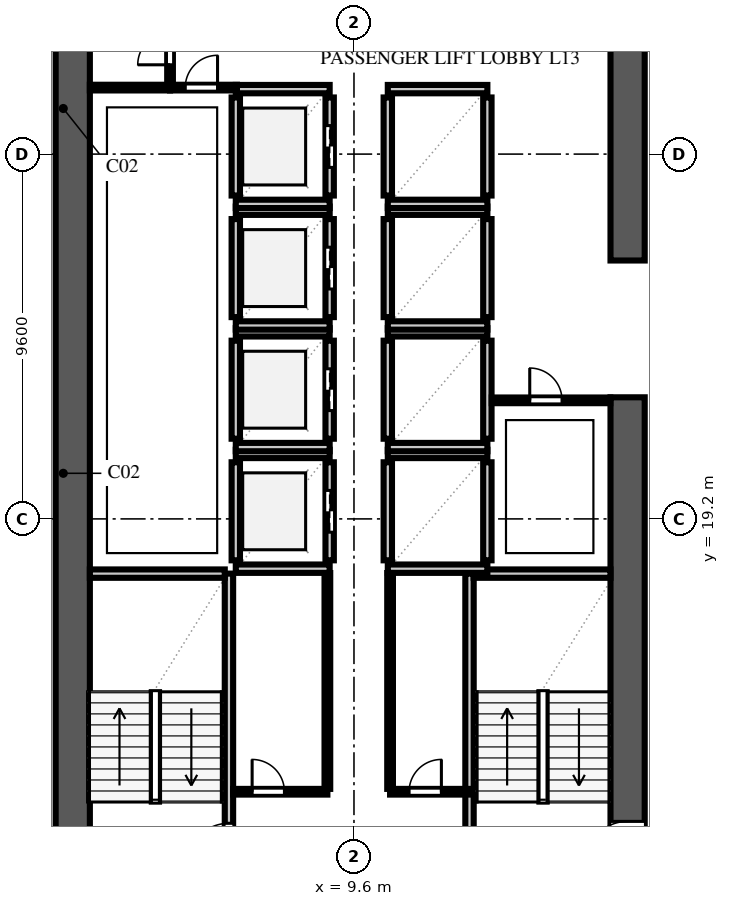
"""IFC4 building model, lengths in metres.
Left out: names, types, materials, properties, quantities, classifications, styles, units other than length and angle.
Written with IfcOpenShell. Run it as: python <this file> out.ifc"""

import sys

from ifc_helpers import new_model, si_unit, direction, frame, frame_2d, origin, place, context, subcontext, project, spatial, rectangle, extrude, element, fill, save


model = new_model("IFC4")
c1 = context("Model", 3, precision=1e-05, world=origin(), true_north=direction((0.0, 1.0)))
c2 = subcontext(c1, "Body", "Model", "MODEL_VIEW")
j1 = project(units=[si_unit("LENGTHUNIT", "METRE"), si_unit("PLANEANGLEUNIT", "RADIAN")], contexts=[c1])
p1 = place(None, origin())
s1 = spatial("IfcSite", under=j1, at=p1, CompositionType="ELEMENT")
p2 = place(p1, origin())
s2 = spatial("IfcBuilding", under=s1, at=p2, CompositionType="ELEMENT")
p3 = place(p2, frame((0.0, 0.0, 54.6)))
s3 = spatial("IfcBuildingStorey", under=s2, at=p3, CompositionType="ELEMENT", Elevation=54.6)
p4 = place(p3, frame((2.2, 9.15, 0.0), z_axis=(0.0, 0.0, 1.0), x_axis=(0.0, 1.0, 0.0)))
e1 = element("IfcWall", 1, at=p4, inside=s3, PredefinedType="SHEAR", context=c2, shape_type="SweptSolid", body=[
    extrude(rectangle(XDim=39.3, YDim=0.9, at=frame_2d((19.65, 0.0))), origin(), (0.0, 0.0, 1.0), 3.54),
])
p5 = place(p3, frame((16.8, 10.05, 0.0), z_axis=(0.0, 0.0, 1.0), x_axis=(0.0, 1.0, 0.0)))
e2 = element("IfcWall", 2, at=p5, inside=s3, PredefinedType="SHEAR", context=c2, shape_type="SweptSolid", body=[
    extrude(rectangle(XDim=12.35, YDim=0.9, at=frame_2d((6.175, 0.0))), origin(), (0.0, 0.0, 1.0), 3.54),
])
p6 = place(p5, frame((0.09, 0.0, 0.0)))
e3 = element("IfcOpeningElement", 3, at=p6, cuts=e2, PredefinedType="OPENING", context=c2, shape_type="SweptSolid", body=[
    extrude(rectangle(XDim=1.1, YDim=2.2, at=frame_2d((0.55, 1.1))), frame((0.0, 0.462, 0.0), z_axis=(0.0, -1.0, 0.0), x_axis=(1.0, 0.0, 0.0)), (0.0, 0.0, 1.0), 0.924),
])
p7 = place(p3, frame((16.8, 26.0, 0.0), z_axis=(0.0, 0.0, 1.0), x_axis=(0.0, 1.0, 0.0)))
e4 = element("IfcWall", 4, at=p7, inside=s3, PredefinedType="SHEAR", context=c2, shape_type="SweptSolid", body=[
    extrude(rectangle(XDim=7.8, YDim=0.9, at=frame_2d((3.9, 0.0))), origin(), (0.0, 0.0, 1.0), 3.54),
])
p8 = place(p3, frame((6.31, 9.95, 0.0), z_axis=(0.0, 0.0, 1.0), x_axis=(0.0, 1.0, 0.0)))
e5 = element("IfcWall", 5, at=p8, inside=s3, PredefinedType="SOLIDWALL", context=c2, shape_type="SweptSolid", body=[
    extrude(rectangle(XDim=7.81, YDim=0.22, at=frame_2d((3.905, 0.0))), origin(), (0.0, 0.0, 1.0), 3.54),
])
p9 = place(p8, frame((0.14, 0.0, 0.0)))
e6 = element("IfcOpeningElement", 6, at=p9, cuts=e5, PredefinedType="OPENING", context=c2, shape_type="SweptSolid", body=[
    extrude(rectangle(XDim=1.1, YDim=2.2, at=frame_2d((0.55, 1.1))), frame((0.0, 0.122, 0.0), z_axis=(0.0, -1.0, 0.0), x_axis=(1.0, 0.0, 0.0)), (0.0, 0.0, 1.0), 0.244),
])
p10 = place(p3, frame((2.65, 17.76, 0.0), z_axis=(0.0, 0.0, 1.0), x_axis=(1.0, 0.0, 0.0)))
e7 = element("IfcWall", 7, at=p10, inside=s3, PredefinedType="SOLIDWALL", context=c2, shape_type="SweptSolid", body=[
    extrude(rectangle(XDim=3.55, YDim=0.22, at=frame_2d((1.775, 0.0))), origin(), (0.0, 0.0, 1.0), 3.54),
])
p11 = place(p3, frame((12.64, 10.05, 0.0), z_axis=(0.0, 0.0, 1.0), x_axis=(0.0, 1.0, 0.0)))
e8 = element("IfcWall", 8, at=p11, inside=s3, PredefinedType="SOLIDWALL", context=c2, shape_type="SweptSolid", body=[
    extrude(rectangle(XDim=7.71, YDim=0.22, at=frame_2d((3.855, 0.0))), origin(), (0.0, 0.0, 1.0), 3.54),
])
p12 = place(p3, frame((12.75, 17.76, 0.0), z_axis=(0.0, 0.0, 1.0), x_axis=(1.0, 0.0, 0.0)))
e9 = element("IfcWall", 9, at=p12, inside=s3, PredefinedType="SOLIDWALL", context=c2, shape_type="SweptSolid", body=[
    extrude(rectangle(XDim=3.6, YDim=0.22, at=frame_2d((1.8, 0.0))), origin(), (0.0, 0.0, 1.0), 3.54),
])
p13 = place(p3, frame((6.49, 18.11, 0.0), z_axis=(0.0, 0.0, 1.0), x_axis=(0.0, 1.0, 0.0)))
e10 = element("IfcWall", 10, at=p13, inside=s3, PredefinedType="SOLIDWALL", context=c2, shape_type="SweptSolid", body=[
    extrude(rectangle(XDim=2.58, YDim=0.22, at=frame_2d((1.29, 0.0))), origin(), (0.0, 0.0, 1.0), 3.54),
])
p14 = place(p3, frame((8.96, 18.11, 0.0), z_axis=(0.0, 0.0, 1.0), x_axis=(0.0, 1.0, 0.0)))
e11 = element("IfcWall", 11, at=p14, inside=s3, PredefinedType="SOLIDWALL", context=c2, shape_type="SweptSolid", body=[
    extrude(rectangle(XDim=2.58, YDim=0.22, at=frame_2d((1.29, 0.0))), origin(), (0.0, 0.0, 1.0), 3.54),
])
p15 = place(p14, frame((0.74, 0.0, 0.0)))
e12 = element("IfcOpeningElement", 12, at=p15, cuts=e11, PredefinedType="OPENING", context=c2, shape_type="SweptSolid", body=[
    extrude(rectangle(XDim=1.1, YDim=2.2, at=frame_2d((0.55, 1.1))), frame((0.0, 0.122, 0.0), z_axis=(0.0, -1.0, 0.0), x_axis=(1.0, 0.0, 0.0)), (0.0, 0.0, 1.0), 0.244),
])
for number, where, z_axis, x_axis in (
    (13, (6.49, 17.89, 0.0), (0.0, 0.0, 1.0), (1.0, 0.0, 0.0)),
    (14, (6.49, 20.91, 0.0), (0.0, 0.0, 1.0), (1.0, 0.0, 0.0)),
):
    element("IfcWall", number, at=place(p3, frame(where, z_axis=z_axis, x_axis=x_axis)), inside=s3, PredefinedType="SOLIDWALL", context=c2, shape_type="SweptSolid", body=[
        extrude(rectangle(XDim=2.47, YDim=0.22, at=frame_2d((1.235, 0.0))), origin(), (0.0, 0.0, 1.0), 3.54),
    ])
p16 = place(p3, frame((6.49, 21.31, 0.0), z_axis=(0.0, 0.0, 1.0), x_axis=(0.0, 1.0, 0.0)))
e15 = element("IfcWall", 15, at=p16, inside=s3, PredefinedType="SOLIDWALL", context=c2, shape_type="SweptSolid", body=[
    extrude(rectangle(XDim=2.58, YDim=0.22, at=frame_2d((1.29, 0.0))), origin(), (0.0, 0.0, 1.0), 3.54),
])
p17 = place(p3, frame((8.96, 21.31, 0.0), z_axis=(0.0, 0.0, 1.0), x_axis=(0.0, 1.0, 0.0)))
e16 = element("IfcWall", 16, at=p17, inside=s3, PredefinedType="SOLIDWALL", context=c2, shape_type="SweptSolid", body=[
    extrude(rectangle(XDim=2.58, YDim=0.22, at=frame_2d((1.29, 0.0))), origin(), (0.0, 0.0, 1.0), 3.54),
])
p18 = place(p17, frame((0.74, 0.0, 0.0)))
e17 = element("IfcOpeningElement", 17, at=p18, cuts=e16, PredefinedType="OPENING", context=c2, shape_type="SweptSolid", body=[
    extrude(rectangle(XDim=1.1, YDim=2.2, at=frame_2d((0.55, 1.1))), frame((0.0, 0.122, 0.0), z_axis=(0.0, -1.0, 0.0), x_axis=(1.0, 0.0, 0.0)), (0.0, 0.0, 1.0), 0.244),
])
for number, where, z_axis, x_axis in (
    (18, (6.49, 21.09, 0.0), (0.0, 0.0, 1.0), (1.0, 0.0, 0.0)),
    (19, (6.49, 24.11, 0.0), (0.0, 0.0, 1.0), (1.0, 0.0, 0.0)),
):
    element("IfcWall", number, at=place(p3, frame(where, z_axis=z_axis, x_axis=x_axis)), inside=s3, PredefinedType="SOLIDWALL", context=c2, shape_type="SweptSolid", body=[
        extrude(rectangle(XDim=2.47, YDim=0.22, at=frame_2d((1.235, 0.0))), origin(), (0.0, 0.0, 1.0), 3.54),
    ])
p19 = place(p3, frame((6.49, 24.51, 0.0), z_axis=(0.0, 0.0, 1.0), x_axis=(0.0, 1.0, 0.0)))
e20 = element("IfcWall", 20, at=p19, inside=s3, PredefinedType="SOLIDWALL", context=c2, shape_type="SweptSolid", body=[
    extrude(rectangle(XDim=2.58, YDim=0.22, at=frame_2d((1.29, 0.0))), origin(), (0.0, 0.0, 1.0), 3.54),
])
p20 = place(p3, frame((8.96, 24.51, 0.0), z_axis=(0.0, 0.0, 1.0), x_axis=(0.0, 1.0, 0.0)))
e21 = element("IfcWall", 21, at=p20, inside=s3, PredefinedType="SOLIDWALL", context=c2, shape_type="SweptSolid", body=[
    extrude(rectangle(XDim=2.58, YDim=0.22, at=frame_2d((1.29, 0.0))), origin(), (0.0, 0.0, 1.0), 3.54),
])
p21 = place(p20, frame((0.74, 0.0, 0.0)))
e22 = element("IfcOpeningElement", 22, at=p21, cuts=e21, PredefinedType="OPENING", context=c2, shape_type="SweptSolid", body=[
    extrude(rectangle(XDim=1.1, YDim=2.2, at=frame_2d((0.55, 1.1))), frame((0.0, 0.122, 0.0), z_axis=(0.0, -1.0, 0.0), x_axis=(1.0, 0.0, 0.0)), (0.0, 0.0, 1.0), 0.244),
])
for number, where, z_axis, x_axis in (
    (23, (6.49, 24.29, 0.0), (0.0, 0.0, 1.0), (1.0, 0.0, 0.0)),
    (24, (6.49, 27.31, 0.0), (0.0, 0.0, 1.0), (1.0, 0.0, 0.0)),
):
    element("IfcWall", number, at=place(p3, frame(where, z_axis=z_axis, x_axis=x_axis)), inside=s3, PredefinedType="SOLIDWALL", context=c2, shape_type="SweptSolid", body=[
        extrude(rectangle(XDim=2.47, YDim=0.22, at=frame_2d((1.235, 0.0))), origin(), (0.0, 0.0, 1.0), 3.54),
    ])
p22 = place(p3, frame((6.49, 27.71, 0.0), z_axis=(0.0, 0.0, 1.0), x_axis=(0.0, 1.0, 0.0)))
e25 = element("IfcWall", 25, at=p22, inside=s3, PredefinedType="SOLIDWALL", context=c2, shape_type="SweptSolid", body=[
    extrude(rectangle(XDim=2.58, YDim=0.22, at=frame_2d((1.29, 0.0))), origin(), (0.0, 0.0, 1.0), 3.54),
])
p23 = place(p3, frame((8.96, 27.71, 0.0), z_axis=(0.0, 0.0, 1.0), x_axis=(0.0, 1.0, 0.0)))
e26 = element("IfcWall", 26, at=p23, inside=s3, PredefinedType="SOLIDWALL", context=c2, shape_type="SweptSolid", body=[
    extrude(rectangle(XDim=2.58, YDim=0.22, at=frame_2d((1.29, 0.0))), origin(), (0.0, 0.0, 1.0), 3.54),
])
p24 = place(p23, frame((0.74, 0.0, 0.0)))
e27 = element("IfcOpeningElement", 27, at=p24, cuts=e26, PredefinedType="OPENING", context=c2, shape_type="SweptSolid", body=[
    extrude(rectangle(XDim=1.1, YDim=2.2, at=frame_2d((0.55, 1.1))), frame((0.0, 0.122, 0.0), z_axis=(0.0, -1.0, 0.0), x_axis=(1.0, 0.0, 0.0)), (0.0, 0.0, 1.0), 0.244),
])
for number, where, z_axis, x_axis in (
    (28, (6.49, 27.49, 0.0), (0.0, 0.0, 1.0), (1.0, 0.0, 0.0)),
    (29, (6.49, 30.51, 0.0), (0.0, 0.0, 1.0), (1.0, 0.0, 0.0)),
):
    element("IfcWall", number, at=place(p3, frame(where, z_axis=z_axis, x_axis=x_axis)), inside=s3, PredefinedType="SOLIDWALL", context=c2, shape_type="SweptSolid", body=[
        extrude(rectangle(XDim=2.47, YDim=0.22, at=frame_2d((1.235, 0.0))), origin(), (0.0, 0.0, 1.0), 3.54),
    ])
for number, where, z_axis, x_axis in (
    (30, (10.49, 18.11, 0.0), (0.0, 0.0, 1.0), (0.0, 1.0, 0.0)),
    (31, (13.11, 18.11, 0.0), (0.0, 0.0, 1.0), (0.0, 1.0, 0.0)),
):
    element("IfcWall", number, at=place(p3, frame(where, z_axis=z_axis, x_axis=x_axis)), inside=s3, PredefinedType="SOLIDWALL", context=c2, shape_type="SweptSolid", body=[
        extrude(rectangle(XDim=2.58, YDim=0.22, at=frame_2d((1.29, 0.0))), origin(), (0.0, 0.0, 1.0), 3.54),
    ])
for number, where, z_axis, x_axis in (
    (32, (10.49, 17.89, 0.0), (0.0, 0.0, 1.0), (1.0, 0.0, 0.0)),
    (33, (10.49, 20.91, 0.0), (0.0, 0.0, 1.0), (1.0, 0.0, 0.0)),
):
    element("IfcWall", number, at=place(p3, frame(where, z_axis=z_axis, x_axis=x_axis)), inside=s3, PredefinedType="SOLIDWALL", context=c2, shape_type="SweptSolid", body=[
        extrude(rectangle(XDim=2.62, YDim=0.22, at=frame_2d((1.31, 0.0))), origin(), (0.0, 0.0, 1.0), 3.54),
    ])
for number, where, z_axis, x_axis in (
    (34, (10.49, 21.31, 0.0), (0.0, 0.0, 1.0), (0.0, 1.0, 0.0)),
    (35, (13.11, 21.31, 0.0), (0.0, 0.0, 1.0), (0.0, 1.0, 0.0)),
):
    element("IfcWall", number, at=place(p3, frame(where, z_axis=z_axis, x_axis=x_axis)), inside=s3, PredefinedType="SOLIDWALL", context=c2, shape_type="SweptSolid", body=[
        extrude(rectangle(XDim=2.58, YDim=0.22, at=frame_2d((1.29, 0.0))), origin(), (0.0, 0.0, 1.0), 3.54),
    ])
for number, where, z_axis, x_axis in (
    (36, (10.49, 21.09, 0.0), (0.0, 0.0, 1.0), (1.0, 0.0, 0.0)),
    (37, (10.49, 24.11, 0.0), (0.0, 0.0, 1.0), (1.0, 0.0, 0.0)),
):
    element("IfcWall", number, at=place(p3, frame(where, z_axis=z_axis, x_axis=x_axis)), inside=s3, PredefinedType="SOLIDWALL", context=c2, shape_type="SweptSolid", body=[
        extrude(rectangle(XDim=2.62, YDim=0.22, at=frame_2d((1.31, 0.0))), origin(), (0.0, 0.0, 1.0), 3.54),
    ])
for number, where, z_axis, x_axis in (
    (38, (10.49, 24.51, 0.0), (0.0, 0.0, 1.0), (0.0, 1.0, 0.0)),
    (39, (13.11, 24.51, 0.0), (0.0, 0.0, 1.0), (0.0, 1.0, 0.0)),
):
    element("IfcWall", number, at=place(p3, frame(where, z_axis=z_axis, x_axis=x_axis)), inside=s3, PredefinedType="SOLIDWALL", context=c2, shape_type="SweptSolid", body=[
        extrude(rectangle(XDim=2.58, YDim=0.22, at=frame_2d((1.29, 0.0))), origin(), (0.0, 0.0, 1.0), 3.54),
    ])
for number, where, z_axis, x_axis in (
    (40, (10.49, 24.29, 0.0), (0.0, 0.0, 1.0), (1.0, 0.0, 0.0)),
    (41, (10.49, 27.31, 0.0), (0.0, 0.0, 1.0), (1.0, 0.0, 0.0)),
):
    element("IfcWall", number, at=place(p3, frame(where, z_axis=z_axis, x_axis=x_axis)), inside=s3, PredefinedType="SOLIDWALL", context=c2, shape_type="SweptSolid", body=[
        extrude(rectangle(XDim=2.62, YDim=0.22, at=frame_2d((1.31, 0.0))), origin(), (0.0, 0.0, 1.0), 3.54),
    ])
for number, where, z_axis, x_axis in (
    (42, (10.49, 27.71, 0.0), (0.0, 0.0, 1.0), (0.0, 1.0, 0.0)),
    (43, (13.11, 27.71, 0.0), (0.0, 0.0, 1.0), (0.0, 1.0, 0.0)),
):
    element("IfcWall", number, at=place(p3, frame(where, z_axis=z_axis, x_axis=x_axis)), inside=s3, PredefinedType="SOLIDWALL", context=c2, shape_type="SweptSolid", body=[
        extrude(rectangle(XDim=2.58, YDim=0.22, at=frame_2d((1.29, 0.0))), origin(), (0.0, 0.0, 1.0), 3.54),
    ])
for number, where, z_axis, x_axis in (
    (44, (10.49, 27.49, 0.0), (0.0, 0.0, 1.0), (1.0, 0.0, 0.0)),
    (45, (10.49, 30.51, 0.0), (0.0, 0.0, 1.0), (1.0, 0.0, 0.0)),
):
    element("IfcWall", number, at=place(p3, frame(where, z_axis=z_axis, x_axis=x_axis)), inside=s3, PredefinedType="SOLIDWALL", context=c2, shape_type="SweptSolid", body=[
        extrude(rectangle(XDim=2.62, YDim=0.22, at=frame_2d((1.31, 0.0))), origin(), (0.0, 0.0, 1.0), 3.54),
    ])
p25 = place(p3, frame((6.42, 12.02, 0.0), z_axis=(0.0, 0.0, 1.0), x_axis=(1.0, 0.0, 0.0)))
e46 = element("IfcWall", 46, at=p25, inside=s3, PredefinedType="PARTITIONING", context=c2, shape_type="SweptSolid", body=[
    extrude(rectangle(XDim=2.48, YDim=0.15, at=frame_2d((1.24, 0.0))), origin(), (0.0, 0.0, 1.0), 3.54),
])
p26 = place(p25, frame((0.5, 0.0, 0.0)))
e47 = element("IfcOpeningElement", 47, at=p26, cuts=e46, PredefinedType="OPENING", context=c2, shape_type="SweptSolid", body=[
    extrude(rectangle(XDim=0.85, YDim=2.1, at=frame_2d((0.425, 1.05))), frame((0.0, 0.087, 0.0), z_axis=(0.0, -1.0, 0.0), x_axis=(1.0, 0.0, 0.0)), (0.0, 0.0, 1.0), 0.174),
])
p27 = place(p3, frame((10.55, 12.02, 0.0), z_axis=(0.0, 0.0, 1.0), x_axis=(1.0, 0.0, 0.0)))
e48 = element("IfcWall", 48, at=p27, inside=s3, PredefinedType="PARTITIONING", context=c2, shape_type="SweptSolid", body=[
    extrude(rectangle(XDim=2.08, YDim=0.15, at=frame_2d((1.04, 0.0))), origin(), (0.0, 0.0, 1.0), 3.54),
])
p28 = place(p27, frame((0.5, 0.0, 0.0)))
e49 = element("IfcOpeningElement", 49, at=p28, cuts=e48, PredefinedType="OPENING", context=c2, shape_type="SweptSolid", body=[
    extrude(rectangle(XDim=0.85, YDim=2.1, at=frame_2d((0.425, 1.05))), frame((0.0, 0.087, 0.0), z_axis=(0.0, -1.0, 0.0), x_axis=(1.0, 0.0, 0.0)), (0.0, 0.0, 1.0), 0.174),
])
for number, where, z_axis, x_axis in (
    (50, (8.9, 12.095, 0.0), (0.0, 0.0, 1.0), (0.0, 1.0, 0.0)),
    (51, (10.55, 12.095, 0.0), (0.0, 0.0, 1.0), (0.0, 1.0, 0.0)),
):
    element("IfcWall", number, at=place(p3, frame(where, z_axis=z_axis, x_axis=x_axis)), inside=s3, PredefinedType="PARTITIONING", context=c2, shape_type="SweptSolid", body=[
        extrude(rectangle(XDim=5.68, YDim=0.15, at=frame_2d((2.84, 0.0))), origin(), (0.0, 0.0, 1.0), 3.54),
    ])
p29 = place(p3, frame((13.225, 22.32, 0.0), z_axis=(0.0, 0.0, 1.0), x_axis=(1.0, 0.0, 0.0)))
e52 = element("IfcWall", 52, at=p29, inside=s3, PredefinedType="PARTITIONING", context=c2, shape_type="SweptSolid", body=[
    extrude(rectangle(XDim=3.12, YDim=0.15, at=frame_2d((1.56, 0.0))), origin(), (0.0, 0.0, 1.0), 3.54),
])
p30 = place(p29, frame((1.0, 0.0, 0.0)))
e53 = element("IfcOpeningElement", 53, at=p30, cuts=e52, PredefinedType="OPENING", context=c2, shape_type="SweptSolid", body=[
    extrude(rectangle(XDim=0.85, YDim=2.1, at=frame_2d((0.425, 1.05))), frame((0.0, 0.087, 0.0), z_axis=(0.0, -1.0, 0.0), x_axis=(1.0, 0.0, 0.0)), (0.0, 0.0, 1.0), 0.174),
])
p31 = place(p3, frame((4.76, 30.55, 0.0), z_axis=(0.0, 0.0, 1.0), x_axis=(0.0, 1.0, 0.0)))
e54 = element("IfcWall", 54, at=p31, inside=s3, PredefinedType="PARTITIONING", context=c2, shape_type="SweptSolid", body=[
    extrude(rectangle(XDim=2.93, YDim=0.15, at=frame_2d((1.465, 0.0))), origin(), (0.0, 0.0, 1.0), 3.54),
])
p32 = place(p31, frame((0.6, 0.0, 0.0)))
e55 = element("IfcOpeningElement", 55, at=p32, cuts=e54, PredefinedType="OPENING", context=c2, shape_type="SweptSolid", body=[
    extrude(rectangle(XDim=0.85, YDim=2.1, at=frame_2d((0.425, 1.05))), frame((0.0, 0.087, 0.0), z_axis=(0.0, -1.0, 0.0), x_axis=(1.0, 0.0, 0.0)), (0.0, 0.0, 1.0), 0.174),
])
p33 = place(p3, frame((4.76, 30.55, 0.0), z_axis=(0.0, 0.0, 1.0), x_axis=(1.0, 0.0, 0.0)))
e56 = element("IfcWall", 56, at=p33, inside=s3, PredefinedType="PARTITIONING", context=c2, shape_type="SweptSolid", body=[
    extrude(rectangle(XDim=1.76, YDim=0.15, at=frame_2d((0.88, 0.0))), origin(), (0.0, 0.0, 1.0), 3.54),
])
p34 = place(p33, frame((0.4, 0.0, 0.0)))
e57 = element("IfcOpeningElement", 57, at=p34, cuts=e56, PredefinedType="OPENING", context=c2, shape_type="SweptSolid", body=[
    extrude(rectangle(XDim=0.85, YDim=2.1, at=frame_2d((0.425, 1.05))), frame((0.0, 0.087, 0.0), z_axis=(0.0, -1.0, 0.0), x_axis=(1.0, 0.0, 0.0)), (0.0, 0.0, 1.0), 0.174),
])
p35 = place(p3, frame((2.65, 30.55, 0.0), z_axis=(0.0, 0.0, 1.0), x_axis=(1.0, 0.0, 0.0)))
e58 = element("IfcWall", 58, at=p35, inside=s3, PredefinedType="PARTITIONING", context=c2, shape_type="SweptSolid", body=[
    extrude(rectangle(XDim=2.11, YDim=0.15, at=frame_2d((1.055, 0.0))), origin(), (0.0, 0.0, 1.0), 3.54),
])
p36 = place(p9, origin())
e59 = element("IfcDoor", 59, at=p36, inside=s3, OperationType="SINGLE_SWING_LEFT", PredefinedType="DOOR", context=c2, shape_type="SweptSolid", body=[
    extrude(rectangle(XDim=1.1, YDim=2.2, at=frame_2d((0.55, 1.1))), frame((0.0, 0.025, 0.0), z_axis=(0.0, -1.0, 0.0), x_axis=(1.0, 0.0, 0.0)), (0.0, 0.0, 1.0), 0.05),
])
fill(e6, e59)
p37 = place(p6, origin())
e60 = element("IfcDoor", 60, at=p37, inside=s3, OperationType="SINGLE_SWING_LEFT", PredefinedType="DOOR", context=c2, shape_type="SweptSolid", body=[
    extrude(rectangle(XDim=1.1, YDim=2.2, at=frame_2d((0.55, 1.1))), frame((0.0, 0.025, 0.0), z_axis=(0.0, -1.0, 0.0), x_axis=(1.0, 0.0, 0.0)), (0.0, 0.0, 1.0), 0.05),
])
fill(e3, e60)
p38 = place(p15, origin())
e61 = element("IfcDoor", 61, at=p38, inside=s3, OperationType="DOUBLE_DOOR_SLIDING", PredefinedType="DOOR", context=c2, shape_type="SweptSolid", body=[
    extrude(rectangle(XDim=1.1, YDim=2.2, at=frame_2d((0.55, 1.1))), frame((0.0, 0.025, 0.0), z_axis=(0.0, -1.0, 0.0), x_axis=(1.0, 0.0, 0.0)), (0.0, 0.0, 1.0), 0.05),
])
fill(e12, e61)
p39 = place(p18, origin())
e62 = element("IfcDoor", 62, at=p39, inside=s3, OperationType="DOUBLE_DOOR_SLIDING", PredefinedType="DOOR", context=c2, shape_type="SweptSolid", body=[
    extrude(rectangle(XDim=1.1, YDim=2.2, at=frame_2d((0.55, 1.1))), frame((0.0, 0.025, 0.0), z_axis=(0.0, -1.0, 0.0), x_axis=(1.0, 0.0, 0.0)), (0.0, 0.0, 1.0), 0.05),
])
fill(e17, e62)
p40 = place(p21, origin())
e63 = element("IfcDoor", 63, at=p40, inside=s3, OperationType="DOUBLE_DOOR_SLIDING", PredefinedType="DOOR", context=c2, shape_type="SweptSolid", body=[
    extrude(rectangle(XDim=1.1, YDim=2.2, at=frame_2d((0.55, 1.1))), frame((0.0, 0.025, 0.0), z_axis=(0.0, -1.0, 0.0), x_axis=(1.0, 0.0, 0.0)), (0.0, 0.0, 1.0), 0.05),
])
fill(e22, e63)
p41 = place(p24, origin())
e64 = element("IfcDoor", 64, at=p41, inside=s3, OperationType="DOUBLE_DOOR_SLIDING", PredefinedType="DOOR", context=c2, shape_type="SweptSolid", body=[
    extrude(rectangle(XDim=1.1, YDim=2.2, at=frame_2d((0.55, 1.1))), frame((0.0, 0.025, 0.0), z_axis=(0.0, -1.0, 0.0), x_axis=(1.0, 0.0, 0.0)), (0.0, 0.0, 1.0), 0.05),
])
fill(e27, e64)
p42 = place(p26, origin())
e65 = element("IfcDoor", 65, at=p42, inside=s3, OperationType="SINGLE_SWING_LEFT", PredefinedType="DOOR", context=c2, shape_type="SweptSolid", body=[
    extrude(rectangle(XDim=0.85, YDim=2.1, at=frame_2d((0.425, 1.05))), frame((0.0, 0.025, 0.0), z_axis=(0.0, -1.0, 0.0), x_axis=(1.0, 0.0, 0.0)), (0.0, 0.0, 1.0), 0.05),
])
fill(e47, e65)
p43 = place(p28, origin())
e66 = element("IfcDoor", 66, at=p43, inside=s3, OperationType="SINGLE_SWING_RIGHT", PredefinedType="DOOR", context=c2, shape_type="SweptSolid", body=[
    extrude(rectangle(XDim=0.85, YDim=2.1, at=frame_2d((0.425, 1.05))), frame((0.0, 0.025, 0.0), z_axis=(0.0, -1.0, 0.0), x_axis=(1.0, 0.0, 0.0)), (0.0, 0.0, 1.0), 0.05),
])
fill(e49, e66)
p44 = place(p30, origin())
e67 = element("IfcDoor", 67, at=p44, inside=s3, OperationType="SINGLE_SWING_LEFT", PredefinedType="DOOR", context=c2, shape_type="SweptSolid", body=[
    extrude(rectangle(XDim=0.85, YDim=2.1, at=frame_2d((0.425, 1.05))), frame((0.0, 0.025, 0.0), z_axis=(0.0, -1.0, 0.0), x_axis=(1.0, 0.0, 0.0)), (0.0, 0.0, 1.0), 0.05),
])
fill(e53, e67)
p45 = place(p32, origin())
e68 = element("IfcDoor", 68, at=p45, inside=s3, OperationType="SINGLE_SWING_LEFT", PredefinedType="DOOR", context=c2, shape_type="SweptSolid", body=[
    extrude(rectangle(XDim=0.85, YDim=2.1, at=frame_2d((0.425, 1.05))), frame((0.0, 0.025, 0.0), z_axis=(0.0, -1.0, 0.0), x_axis=(1.0, 0.0, 0.0)), (0.0, 0.0, 1.0), 0.05),
])
fill(e55, e68)
p46 = place(p34, origin())
e69 = element("IfcDoor", 69, at=p46, inside=s3, OperationType="SINGLE_SWING_RIGHT", PredefinedType="DOOR", context=c2, shape_type="SweptSolid", body=[
    extrude(rectangle(XDim=0.85, YDim=2.1, at=frame_2d((0.425, 1.05))), frame((0.0, 0.025, 0.0), z_axis=(0.0, -1.0, 0.0), x_axis=(1.0, 0.0, 0.0)), (0.0, 0.0, 1.0), 0.05),
])
fill(e57, e69)
save(model, sys.argv[1])
